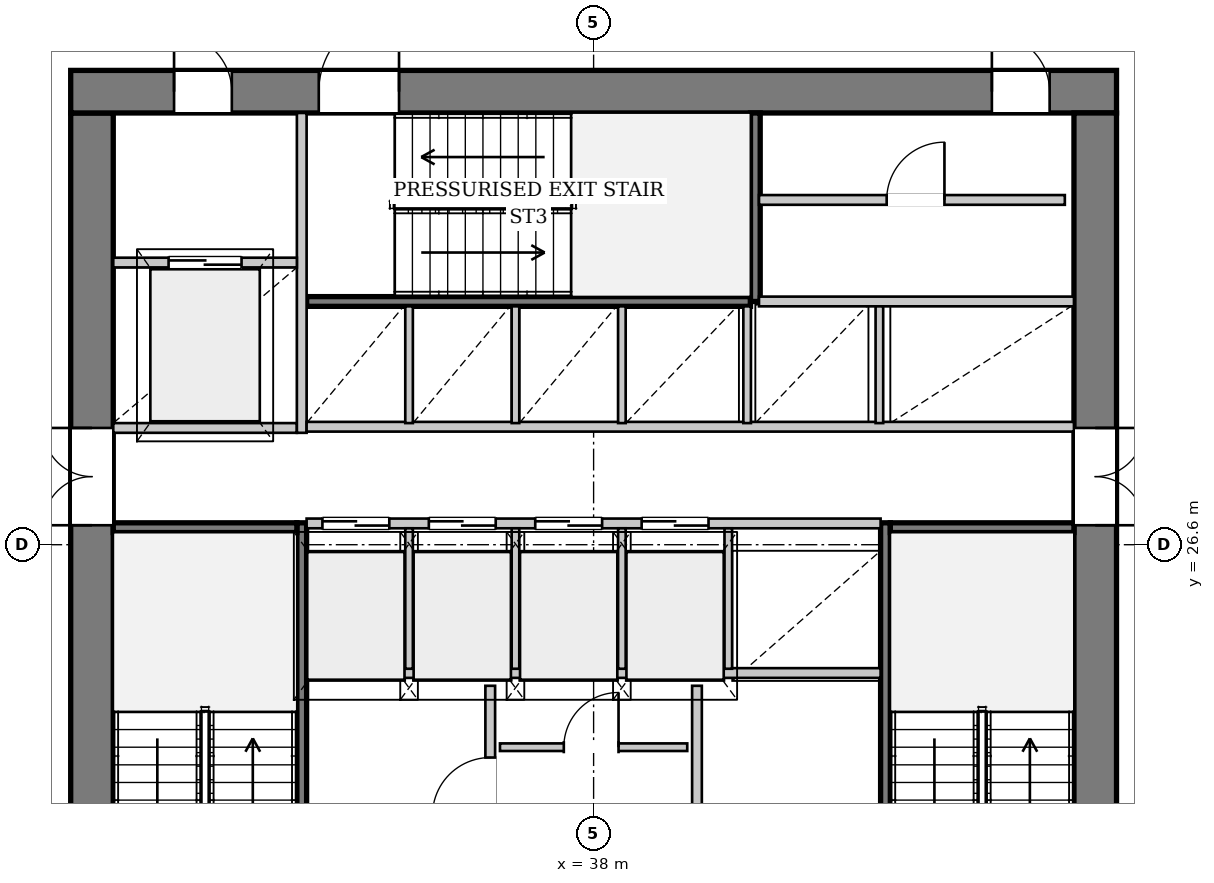
"""IFC4 building model, lengths in metres.
Left out: names, types, materials, properties, quantities, classifications, styles, units other than length and angle.
Written with IfcOpenShell. Run it as: python <this file> out.ifc"""

import sys

from ifc_helpers import new_model, si_unit, direction, frame, frame_2d, origin, place, context, subcontext, project, spatial, rectangle, extrude, source, transform, mapped, element, fill, save


model = new_model("IFC4")
c1 = context("Model", 3, precision=1e-05, world=origin(), true_north=direction((0.0, 1.0)))
c2 = subcontext(c1, "Body", "Model", "MODEL_VIEW")
j1 = project(units=[si_unit("LENGTHUNIT", "METRE"), si_unit("PLANEANGLEUNIT", "RADIAN")], contexts=[c1])
p1 = place(None, origin())
s1 = spatial("IfcSite", under=j1, at=p1, CompositionType="ELEMENT")
p2 = place(p1, origin())
s2 = spatial("IfcBuilding", under=s1, at=p2, CompositionType="ELEMENT")
p3 = place(p2, frame((0.0, 0.0, 91.5)))
s3 = spatial("IfcBuildingStorey", under=s2, at=p3, CompositionType="ELEMENT", Elevation=91.5)
p4 = place(p3, frame((29.75, 19.5, 0.0), z_axis=(0.0, 0.0, 1.0), x_axis=(0.0, 1.0, 0.0)))
e1 = element("IfcWall", 1, at=p4, inside=s3, PredefinedType="SHEAR", context=c2, shape_type="SweptSolid", body=[
    extrude(rectangle(XDim=14.2, YDim=0.7, at=frame_2d((7.1, 0.0))), origin(), (0.0, 0.0, 1.0), 3.3),
])
p5 = place(p4, frame((7.42, 0.0, 0.0)))
e2 = element("IfcOpeningElement", 2, at=p5, cuts=e1, PredefinedType="OPENING", context=c2, shape_type="SweptSolid", body=[
    extrude(rectangle(XDim=1.6, YDim=2.2, at=frame_2d((0.8, 1.1))), frame((0.0, 0.36, 0.0), z_axis=(0.0, -1.0, 0.0), x_axis=(1.0, 0.0, 0.0)), (0.0, 0.0, 1.0), 0.72),
])
p6 = place(p3, frame((29.4, 34.05, 0.0), z_axis=(0.0, 0.0, 1.0), x_axis=(1.0, 0.0, 0.0)))
e3 = element("IfcWall", 3, at=p6, inside=s3, PredefinedType="SHEAR", context=c2, shape_type="SweptSolid", body=[
    extrude(rectangle(XDim=17.2, YDim=0.7, at=frame_2d((8.6, 0.0))), origin(), (0.0, 0.0, 1.0), 3.3),
])
p7 = place(p6, frame((1.7, 0.0, 0.0)))
e4 = element("IfcOpeningElement", 4, at=p7, cuts=e3, PredefinedType="OPENING", context=c2, shape_type="SweptSolid", body=[
    extrude(rectangle(XDim=0.95, YDim=2.1, at=frame_2d((0.475, 1.05))), frame((0.0, 0.36, 0.0), z_axis=(0.0, -1.0, 0.0), x_axis=(1.0, 0.0, 0.0)), (0.0, 0.0, 1.0), 0.72),
])
p8 = place(p6, frame((4.08, 0.0, 0.0)))
e5 = element("IfcOpeningElement", 5, at=p8, cuts=e3, PredefinedType="OPENING", context=c2, shape_type="SweptSolid", body=[
    extrude(rectangle(XDim=1.32, YDim=2.2, at=frame_2d((0.66, 1.1))), frame((0.0, 0.36, 0.0), z_axis=(0.0, -1.0, 0.0), x_axis=(1.0, 0.0, 0.0)), (0.0, 0.0, 1.0), 0.72),
])
p9 = place(p6, frame((15.15, 0.0, 0.0)))
e6 = element("IfcOpeningElement", 6, at=p9, cuts=e3, PredefinedType="OPENING", context=c2, shape_type="SweptSolid", body=[
    extrude(rectangle(XDim=0.95, YDim=2.1, at=frame_2d((0.475, 1.05))), frame((0.0, 0.36, 0.0), z_axis=(0.0, -1.0, 0.0), x_axis=(1.0, 0.0, 0.0)), (0.0, 0.0, 1.0), 0.72),
])
p10 = place(p3, frame((46.25, 33.7, 0.0), z_axis=(0.0, 0.0, 1.0), x_axis=(0.0, -1.0, 0.0)))
e7 = element("IfcWall", 7, at=p10, inside=s3, PredefinedType="SHEAR", context=c2, shape_type="SweptSolid", body=[
    extrude(rectangle(XDim=14.2, YDim=0.7, at=frame_2d((7.1, 0.0))), origin(), (0.0, 0.0, 1.0), 3.3),
])
p11 = place(p10, frame((5.18, 0.0, 0.0)))
e8 = element("IfcOpeningElement", 8, at=p11, cuts=e7, PredefinedType="OPENING", context=c2, shape_type="SweptSolid", body=[
    extrude(rectangle(XDim=1.6, YDim=2.2, at=frame_2d((0.8, 1.1))), frame((0.0, 0.36, 0.0), z_axis=(0.0, -1.0, 0.0), x_axis=(1.0, 0.0, 0.0)), (0.0, 0.0, 1.0), 0.72),
])
p12 = place(p3, frame((33.2, 19.5, 0.0), z_axis=(0.0, 0.0, 1.0), x_axis=(0.0, 1.0, 0.0)))
e9 = element("IfcWall", 9, at=p12, inside=s3, PredefinedType="PARTITIONING", context=c2, shape_type="SweptSolid", body=[
    extrude(rectangle(XDim=7.46, YDim=0.16, at=frame_2d((3.73, 0.0))), origin(), (0.0, 0.0, 1.0), 3.3),
])
p13 = place(p12, frame((0.08, 0.0, 0.0)))
e10 = element("IfcOpeningElement", 10, at=p13, cuts=e9, PredefinedType="OPENING", context=c2, shape_type="SweptSolid", body=[
    extrude(rectangle(XDim=1.32, YDim=2.2, at=frame_2d((0.66, 1.1))), frame((0.0, 0.09, 0.0), z_axis=(0.0, -1.0, 0.0), x_axis=(1.0, 0.0, 0.0)), (0.0, 0.0, 1.0), 0.18),
])
p14 = place(p3, frame((30.1, 26.88, 0.0), z_axis=(0.0, 0.0, 1.0), x_axis=(1.0, 0.0, 0.0)))
e11 = element("IfcWall", 11, at=p14, inside=s3, PredefinedType="PARTITIONING", context=c2, shape_type="SweptSolid", body=[
    extrude(rectangle(XDim=3.02, YDim=0.16, at=frame_2d((1.51, 0.0))), origin(), (0.0, 0.0, 1.0), 3.3),
])
p15 = place(p3, frame((42.8, 26.96, 0.0), z_axis=(0.0, 0.0, 1.0), x_axis=(0.0, -1.0, 0.0)))
e12 = element("IfcWall", 12, at=p15, inside=s3, PredefinedType="PARTITIONING", context=c2, shape_type="SweptSolid", body=[
    extrude(rectangle(XDim=7.46, YDim=0.16, at=frame_2d((3.73, 0.0))), origin(), (0.0, 0.0, 1.0), 3.3),
])
p16 = place(p15, frame((6.06, 0.0, 0.0)))
e13 = element("IfcOpeningElement", 13, at=p16, cuts=e12, PredefinedType="OPENING", context=c2, shape_type="SweptSolid", body=[
    extrude(rectangle(XDim=1.32, YDim=2.2, at=frame_2d((0.66, 1.1))), frame((0.0, 0.09, 0.0), z_axis=(0.0, -1.0, 0.0), x_axis=(1.0, 0.0, 0.0)), (0.0, 0.0, 1.0), 0.18),
])
p17 = place(p3, frame((42.88, 26.88, 0.0), z_axis=(0.0, 0.0, 1.0), x_axis=(1.0, 0.0, 0.0)))
e14 = element("IfcWall", 14, at=p17, inside=s3, PredefinedType="PARTITIONING", context=c2, shape_type="SweptSolid", body=[
    extrude(rectangle(XDim=3.02, YDim=0.16, at=frame_2d((1.51, 0.0))), origin(), (0.0, 0.0, 1.0), 3.3),
])
p18 = place(p3, frame((33.28, 30.6, 0.0), z_axis=(0.0, 0.0, 1.0), x_axis=(1.0, 0.0, 0.0)))
e15 = element("IfcWall", 15, at=p18, inside=s3, PredefinedType="PARTITIONING", context=c2, shape_type="SweptSolid", body=[
    extrude(rectangle(XDim=7.3, YDim=0.16, at=frame_2d((3.65, 0.0))), origin(), (0.0, 0.0, 1.0), 3.3),
])
p19 = place(p3, frame((40.66, 30.6, 0.0), z_axis=(0.0, 0.0, 1.0), x_axis=(0.0, 1.0, 0.0)))
e16 = element("IfcWall", 16, at=p19, inside=s3, PredefinedType="PARTITIONING", context=c2, shape_type="SweptSolid", body=[
    extrude(rectangle(XDim=3.1, YDim=0.16, at=frame_2d((1.55, 0.0))), origin(), (0.0, 0.0, 1.0), 3.3),
])
p20 = place(p3, frame((36.3, 19.5, 0.0), z_axis=(0.0, 0.0, 1.0), x_axis=(0.0, 1.0, 0.0)))
e17 = element("IfcWall", 17, at=p20, inside=s3, PredefinedType="PARTITIONING", context=c2, shape_type="SweptSolid", body=[
    extrude(rectangle(XDim=4.78, YDim=0.16, at=frame_2d((2.39, 0.0))), origin(), (0.0, 0.0, 1.0), 3.3),
])
p21 = place(p20, frame((0.6, 0.0, 0.0)))
e18 = element("IfcOpeningElement", 18, at=p21, cuts=e17, PredefinedType="OPENING", context=c2, shape_type="SweptSolid", body=[
    extrude(rectangle(XDim=1.2, YDim=2.2, at=frame_2d((0.6, 1.1))), frame((0.0, 0.09, 0.0), z_axis=(0.0, -1.0, 0.0), x_axis=(1.0, 0.0, 0.0)), (0.0, 0.0, 1.0), 0.18),
])
p22 = place(p20, frame((2.65, 0.0, 0.0)))
e19 = element("IfcOpeningElement", 19, at=p22, cuts=e17, PredefinedType="OPENING", context=c2, shape_type="SweptSolid", body=[
    extrude(rectangle(XDim=0.95, YDim=2.1, at=frame_2d((0.475, 1.05))), frame((0.0, 0.09, 0.0), z_axis=(0.0, -1.0, 0.0), x_axis=(1.0, 0.0, 0.0)), (0.0, 0.0, 1.0), 0.18),
])
p23 = place(p3, frame((39.7, 24.28, 0.0), z_axis=(0.0, 0.0, 1.0), x_axis=(0.0, -1.0, 0.0)))
e20 = element("IfcWall", 20, at=p23, inside=s3, PredefinedType="PARTITIONING", context=c2, shape_type="SweptSolid", body=[
    extrude(rectangle(XDim=4.78, YDim=0.16, at=frame_2d((2.39, 0.0))), origin(), (0.0, 0.0, 1.0), 3.3),
])
p24 = place(p23, frame((3.12, 0.0, 0.0)))
e21 = element("IfcOpeningElement", 21, at=p24, cuts=e20, PredefinedType="OPENING", context=c2, shape_type="SweptSolid", body=[
    extrude(rectangle(XDim=1.2, YDim=2.2, at=frame_2d((0.6, 1.1))), frame((0.0, 0.09, 0.0), z_axis=(0.0, -1.0, 0.0), x_axis=(1.0, 0.0, 0.0)), (0.0, 0.0, 1.0), 0.18),
])
p25 = place(p3, frame((33.28, 24.49, 0.0), z_axis=(0.0, 0.0, 1.0), x_axis=(1.0, 0.0, 0.0)))
e22 = element("IfcWall", 22, at=p25, inside=s3, PredefinedType="PARTITIONING", context=c2, shape_type="SweptSolid", body=[
    extrude(rectangle(XDim=9.44, YDim=0.16, at=frame_2d((4.72, 0.0))), origin(), (0.0, 0.0, 1.0), 3.3),
])
p26 = place(p3, frame((36.46, 23.27, 0.0), z_axis=(0.0, 0.0, 1.0), x_axis=(1.0, 0.0, 0.0)))
e23 = element("IfcWall", 23, at=p26, inside=s3, PredefinedType="PARTITIONING", context=c2, shape_type="SweptSolid", body=[
    extrude(rectangle(XDim=3.08, YDim=0.125, at=frame_2d((1.54, 0.0))), origin(), (0.0, 0.0, 1.0), 3.3),
])
p27 = place(p26, frame((1.05, 0.0, 0.0)))
e24 = element("IfcOpeningElement", 24, at=p27, cuts=e23, PredefinedType="OPENING", context=c2, shape_type="SweptSolid", body=[
    extrude(rectangle(XDim=0.9, YDim=2.1, at=frame_2d((0.45, 1.05))), frame((0.0, 0.073, 0.0), z_axis=(0.0, -1.0, 0.0), x_axis=(1.0, 0.0, 0.0)), (0.0, 0.0, 1.0), 0.145),
])
p28 = place(p3, frame((30.1, 28.52, 0.0), z_axis=(0.0, 0.0, 1.0), x_axis=(1.0, 0.0, 0.0)))
e25 = element("IfcWall", 25, at=p28, inside=s3, PredefinedType="PARTITIONING", context=c2, shape_type="SweptSolid", body=[
    extrude(rectangle(XDim=3.02, YDim=0.16, at=frame_2d((1.51, 0.0))), origin(), (0.0, 0.0, 1.0), 3.3),
])
p29 = place(p3, frame((33.2, 28.44, 0.0), z_axis=(0.0, 0.0, 1.0), x_axis=(0.0, 1.0, 0.0)))
e26 = element("IfcWall", 26, at=p29, inside=s3, PredefinedType="PARTITIONING", context=c2, shape_type="SweptSolid", body=[
    extrude(rectangle(XDim=5.26, YDim=0.16, at=frame_2d((2.63, 0.0))), origin(), (0.0, 0.0, 1.0), 3.3),
])
p30 = place(p3, frame((30.1, 31.24, 0.0), z_axis=(0.0, 0.0, 1.0), x_axis=(1.0, 0.0, 0.0)))
e27 = element("IfcWall", 27, at=p30, inside=s3, PredefinedType="PARTITIONING", context=c2, shape_type="SweptSolid", body=[
    extrude(rectangle(XDim=3.02, YDim=0.16, at=frame_2d((1.51, 0.0))), origin(), (0.0, 0.0, 1.0), 3.3),
])
p31 = place(p30, frame((0.91, 0.0, 0.0)))
e28 = element("IfcOpeningElement", 28, at=p31, cuts=e27, PredefinedType="OPENING", context=c2, shape_type="SweptSolid", body=[
    extrude(rectangle(XDim=1.2, YDim=2.2, at=frame_2d((0.6, 1.1))), frame((0.0, 0.09, 0.0), z_axis=(0.0, -1.0, 0.0), x_axis=(1.0, 0.0, 0.0)), (0.0, 0.0, 1.0), 0.18),
])
p32 = place(p3, frame((33.28, 26.95, 0.0), z_axis=(0.0, 0.0, 1.0), x_axis=(1.0, 0.0, 0.0)))
e29 = element("IfcWall", 29, at=p32, inside=s3, PredefinedType="PARTITIONING", context=c2, shape_type="SweptSolid", body=[
    extrude(rectangle(XDim=9.44, YDim=0.16, at=frame_2d((4.72, 0.0))), origin(), (0.0, 0.0, 1.0), 3.3),
])
p33 = place(p32, frame((0.26, 0.0, 0.0)))
e30 = element("IfcOpeningElement", 30, at=p33, cuts=e29, PredefinedType="OPENING", context=c2, shape_type="SweptSolid", body=[
    extrude(rectangle(XDim=1.1, YDim=2.2, at=frame_2d((0.55, 1.1))), frame((0.0, 0.09, 0.0), z_axis=(0.0, -1.0, 0.0), x_axis=(1.0, 0.0, 0.0)), (0.0, 0.0, 1.0), 0.18),
])
p34 = place(p32, frame((2.01, 0.0, 0.0)))
e31 = element("IfcOpeningElement", 31, at=p34, cuts=e29, PredefinedType="OPENING", context=c2, shape_type="SweptSolid", body=[
    extrude(rectangle(XDim=1.1, YDim=2.2, at=frame_2d((0.55, 1.1))), frame((0.0, 0.09, 0.0), z_axis=(0.0, -1.0, 0.0), x_axis=(1.0, 0.0, 0.0)), (0.0, 0.0, 1.0), 0.18),
])
p35 = place(p32, frame((3.76, 0.0, 0.0)))
e32 = element("IfcOpeningElement", 32, at=p35, cuts=e29, PredefinedType="OPENING", context=c2, shape_type="SweptSolid", body=[
    extrude(rectangle(XDim=1.1, YDim=2.2, at=frame_2d((0.55, 1.1))), frame((0.0, 0.09, 0.0), z_axis=(0.0, -1.0, 0.0), x_axis=(1.0, 0.0, 0.0)), (0.0, 0.0, 1.0), 0.18),
])
p36 = place(p32, frame((5.51, 0.0, 0.0)))
e33 = element("IfcOpeningElement", 33, at=p36, cuts=e29, PredefinedType="OPENING", context=c2, shape_type="SweptSolid", body=[
    extrude(rectangle(XDim=1.1, YDim=2.2, at=frame_2d((0.55, 1.1))), frame((0.0, 0.09, 0.0), z_axis=(0.0, -1.0, 0.0), x_axis=(1.0, 0.0, 0.0)), (0.0, 0.0, 1.0), 0.18),
])
for number, where, z_axis, x_axis in (
    (34, (34.965, 24.56, 0.0), (0.0, 0.0, 1.0), (0.0, 1.0, 0.0)),
    (35, (36.715, 24.56, 0.0), (0.0, 0.0, 1.0), (0.0, 1.0, 0.0)),
    (36, (38.465, 24.56, 0.0), (0.0, 0.0, 1.0), (0.0, 1.0, 0.0)),
    (37, (40.215, 24.56, 0.0), (0.0, 0.0, 1.0), (0.0, 1.0, 0.0)),
):
    element("IfcWall", number, at=place(p3, frame(where, z_axis=z_axis, x_axis=x_axis)), inside=s3, PredefinedType="PARTITIONING", context=c2, shape_type="SweptSolid", body=[
        extrude(rectangle(XDim=2.31, YDim=0.125, at=frame_2d((1.155, 0.0))), origin(), (0.0, 0.0, 1.0), 3.3),
    ])
p37 = place(p3, frame((33.28, 28.54, 0.0), z_axis=(0.0, 0.0, 1.0), x_axis=(1.0, 0.0, 0.0)))
e38 = element("IfcWall", 38, at=p37, inside=s3, PredefinedType="PARTITIONING", context=c2, shape_type="SweptSolid", body=[
    extrude(rectangle(XDim=12.62, YDim=0.16, at=frame_2d((6.31, 0.0))), origin(), (0.0, 0.0, 1.0), 3.3),
])
p38 = place(p3, frame((40.72, 30.6, 0.0), z_axis=(0.0, 0.0, 1.0), x_axis=(1.0, 0.0, 0.0)))
e39 = element("IfcWall", 39, at=p38, inside=s3, PredefinedType="PARTITIONING", context=c2, shape_type="SweptSolid", body=[
    extrude(rectangle(XDim=5.18, YDim=0.16, at=frame_2d((2.59, 0.0))), origin(), (0.0, 0.0, 1.0), 3.3),
])
for number, where, z_axis, x_axis in (
    (40, (34.965, 28.6, 0.0), (0.0, 0.0, 1.0), (0.0, 1.0, 0.0)),
    (41, (36.715, 28.6, 0.0), (0.0, 0.0, 1.0), (0.0, 1.0, 0.0)),
    (42, (38.465, 28.6, 0.0), (0.0, 0.0, 1.0), (0.0, 1.0, 0.0)),
    (43, (40.525, 28.6, 0.0), (0.0, 0.0, 1.0), (0.0, 1.0, 0.0)),
    (44, (42.7, 28.6, 0.0), (0.0, 0.0, 1.0), (0.0, 1.0, 0.0)),
):
    element("IfcWall", number, at=place(p3, frame(where, z_axis=z_axis, x_axis=x_axis)), inside=s3, PredefinedType="PARTITIONING", context=c2, shape_type="SweptSolid", body=[
        extrude(rectangle(XDim=1.92, YDim=0.125, at=frame_2d((0.96, 0.0))), origin(), (0.0, 0.0, 1.0), 3.3),
    ])
p39 = place(p3, frame((40.72, 32.27, 0.0), z_axis=(0.0, 0.0, 1.0), x_axis=(1.0, 0.0, 0.0)))
e45 = element("IfcWall", 45, at=p39, inside=s3, PredefinedType="PARTITIONING", context=c2, shape_type="SweptSolid", body=[
    extrude(rectangle(XDim=5.03, YDim=0.16, at=frame_2d((2.515, 0.0))), origin(), (0.0, 0.0, 1.0), 3.3),
])
p40 = place(p39, frame((2.1, 0.0, 0.0)))
e46 = element("IfcOpeningElement", 46, at=p40, cuts=e45, PredefinedType="OPENING", context=c2, shape_type="SweptSolid", body=[
    extrude(rectangle(XDim=0.95, YDim=2.1, at=frame_2d((0.475, 1.05))), frame((0.0, 0.09, 0.0), z_axis=(0.0, -1.0, 0.0), x_axis=(1.0, 0.0, 0.0)), (0.0, 0.0, 1.0), 0.18),
])
m1 = source(origin(), c2, "Body", "SweptSolid", [
    extrude(rectangle(XDim=1.6, YDim=2.2, at=frame_2d((0.8, 1.1))), frame((0.0, 0.025, 0.0), z_axis=(0.0, -1.0, 0.0), x_axis=(1.0, 0.0, 0.0)), (0.0, 0.0, 1.0), 0.05),
])
p41 = place(p5, origin())
e47 = element("IfcDoor", 47, at=p41, inside=s3, OperationType="DOUBLE_DOOR_SINGLE_SWING", PredefinedType="DOOR", context=c2, shape_type="MappedRepresentation", body=[
    mapped(m1, transform((0.0, 0.0, 0.0), x_axis=(1.0, 0.0, 0.0), y_axis=(0.0, 1.0, 0.0), z_axis=(0.0, 0.0, 1.0), scale=1.0)),
])
fill(e2, e47)
m2 = source(origin(), c2, "Body", "SweptSolid", [
    extrude(rectangle(XDim=0.95, YDim=2.1, at=frame_2d((0.475, 1.05))), frame((0.0, 0.025, 0.0), z_axis=(0.0, -1.0, 0.0), x_axis=(1.0, 0.0, 0.0)), (0.0, 0.0, 1.0), 0.05),
])
p42 = place(p7, origin())
e48 = element("IfcDoor", 48, at=p42, inside=s3, OperationType="SINGLE_SWING_LEFT", PredefinedType="DOOR", context=c2, shape_type="MappedRepresentation", body=[
    mapped(m2, transform((0.0, 0.0, 0.0), x_axis=(1.0, 0.0, 0.0), y_axis=(0.0, 1.0, 0.0), z_axis=(0.0, 0.0, 1.0), scale=1.0)),
])
fill(e4, e48)
m3 = source(origin(), c2, "Body", "SweptSolid", [
    extrude(rectangle(XDim=1.32, YDim=2.2, at=frame_2d((0.66, 1.1))), frame((0.0, 0.025, 0.0), z_axis=(0.0, -1.0, 0.0), x_axis=(1.0, 0.0, 0.0)), (0.0, 0.0, 1.0), 0.05),
])
p43 = place(p8, origin())
e49 = element("IfcDoor", 49, at=p43, inside=s3, OperationType="SINGLE_SWING_RIGHT", PredefinedType="DOOR", context=c2, shape_type="MappedRepresentation", body=[
    mapped(m3, transform((0.0, 0.0, 0.0), x_axis=(1.0, 0.0, 0.0), y_axis=(0.0, 1.0, 0.0), z_axis=(0.0, 0.0, 1.0), scale=1.0)),
])
fill(e5, e49)
p44 = place(p11, origin())
e50 = element("IfcDoor", 50, at=p44, inside=s3, OperationType="DOUBLE_DOOR_SINGLE_SWING", PredefinedType="DOOR", context=c2, shape_type="MappedRepresentation", body=[
    mapped(m1, transform((0.0, 0.0, 0.0), x_axis=(1.0, 0.0, 0.0), y_axis=(0.0, 1.0, 0.0), z_axis=(0.0, 0.0, 1.0), scale=1.0)),
])
fill(e8, e50)
p45 = place(p22, origin())
e51 = element("IfcDoor", 51, at=p45, inside=s3, OperationType="SINGLE_SWING_LEFT", PredefinedType="DOOR", context=c2, shape_type="MappedRepresentation", body=[
    mapped(m2, transform((0.0, 0.0, 0.0), x_axis=(1.0, 0.0, 0.0), y_axis=(0.0, 1.0, 0.0), z_axis=(0.0, 0.0, 1.0), scale=1.0)),
])
fill(e19, e51)
m4 = source(origin(), c2, "Body", "SweptSolid", [
    extrude(rectangle(XDim=0.9, YDim=2.1, at=frame_2d((0.45, 1.05))), frame((0.0, 0.025, 0.0), z_axis=(0.0, -1.0, 0.0), x_axis=(1.0, 0.0, 0.0)), (0.0, 0.0, 1.0), 0.05),
])
p46 = place(p27, origin())
e52 = element("IfcDoor", 52, at=p46, inside=s3, OperationType="SINGLE_SWING_RIGHT", PredefinedType="DOOR", context=c2, shape_type="MappedRepresentation", body=[
    mapped(m4, transform((0.0, 0.0, 0.0), x_axis=(1.0, 0.0, 0.0), y_axis=(0.0, 1.0, 0.0), z_axis=(0.0, 0.0, 1.0), scale=1.0)),
])
fill(e24, e52)
m5 = source(origin(), c2, "Body", "SweptSolid", [
    extrude(rectangle(XDim=1.2, YDim=2.2, at=frame_2d((0.6, 1.1))), frame((0.0, 0.025, 0.0), z_axis=(0.0, -1.0, 0.0), x_axis=(1.0, 0.0, 0.0)), (0.0, 0.0, 1.0), 0.05),
])
p47 = place(p31, origin())
e53 = element("IfcDoor", 53, at=p47, inside=s3, OperationType="DOUBLE_DOOR_SLIDING", PredefinedType="DOOR", context=c2, shape_type="MappedRepresentation", body=[
    mapped(m5, transform((0.0, 0.0, 0.0), x_axis=(1.0, 0.0, 0.0), y_axis=(0.0, 1.0, 0.0), z_axis=(0.0, 0.0, 1.0), scale=1.0)),
])
fill(e28, e53)
m6 = source(origin(), c2, "Body", "SweptSolid", [
    extrude(rectangle(XDim=1.1, YDim=2.2, at=frame_2d((0.55, 1.1))), frame((0.0, 0.025, 0.0), z_axis=(0.0, -1.0, 0.0), x_axis=(1.0, 0.0, 0.0)), (0.0, 0.0, 1.0), 0.05),
])
p48 = place(p33, origin())
e54 = element("IfcDoor", 54, at=p48, inside=s3, OperationType="DOUBLE_DOOR_SLIDING", PredefinedType="DOOR", context=c2, shape_type="MappedRepresentation", body=[
    mapped(m6, transform((0.0, 0.0, 0.0), x_axis=(1.0, 0.0, 0.0), y_axis=(0.0, 1.0, 0.0), z_axis=(0.0, 0.0, 1.0), scale=1.0)),
])
fill(e30, e54)
p49 = place(p34, origin())
e55 = element("IfcDoor", 55, at=p49, inside=s3, OperationType="DOUBLE_DOOR_SLIDING", PredefinedType="DOOR", context=c2, shape_type="MappedRepresentation", body=[
    mapped(m6, transform((0.0, 0.0, 0.0), x_axis=(1.0, 0.0, 0.0), y_axis=(0.0, 1.0, 0.0), z_axis=(0.0, 0.0, 1.0), scale=1.0)),
])
fill(e31, e55)
p50 = place(p35, origin())
e56 = element("IfcDoor", 56, at=p50, inside=s3, OperationType="DOUBLE_DOOR_SLIDING", PredefinedType="DOOR", context=c2, shape_type="MappedRepresentation", body=[
    mapped(m6, transform((0.0, 0.0, 0.0), x_axis=(1.0, 0.0, 0.0), y_axis=(0.0, 1.0, 0.0), z_axis=(0.0, 0.0, 1.0), scale=1.0)),
])
fill(e32, e56)
p51 = place(p36, origin())
e57 = element("IfcDoor", 57, at=p51, inside=s3, OperationType="DOUBLE_DOOR_SLIDING", PredefinedType="DOOR", context=c2, shape_type="MappedRepresentation", body=[
    mapped(m6, transform((0.0, 0.0, 0.0), x_axis=(1.0, 0.0, 0.0), y_axis=(0.0, 1.0, 0.0), z_axis=(0.0, 0.0, 1.0), scale=1.0)),
])
fill(e33, e57)
p52 = place(p40, origin())
e58 = element("IfcDoor", 58, at=p52, inside=s3, OperationType="SINGLE_SWING_RIGHT", PredefinedType="DOOR", context=c2, shape_type="MappedRepresentation", body=[
    mapped(m2, transform((0.0, 0.0, 0.0), x_axis=(1.0, 0.0, 0.0), y_axis=(0.0, 1.0, 0.0), z_axis=(0.0, 0.0, 1.0), scale=1.0)),
])
fill(e46, e58)
p53 = place(p9, origin())
e59 = element("IfcDoor", 59, at=p53, inside=s3, OperationType="SINGLE_SWING_LEFT", PredefinedType="DOOR", context=c2, shape_type="MappedRepresentation", body=[
    mapped(m2, transform((0.0, 0.0, 0.0), x_axis=(1.0, 0.0, 0.0), y_axis=(0.0, 1.0, 0.0), z_axis=(0.0, 0.0, 1.0), scale=1.0)),
])
fill(e6, e59)
save(model, sys.argv[1])
